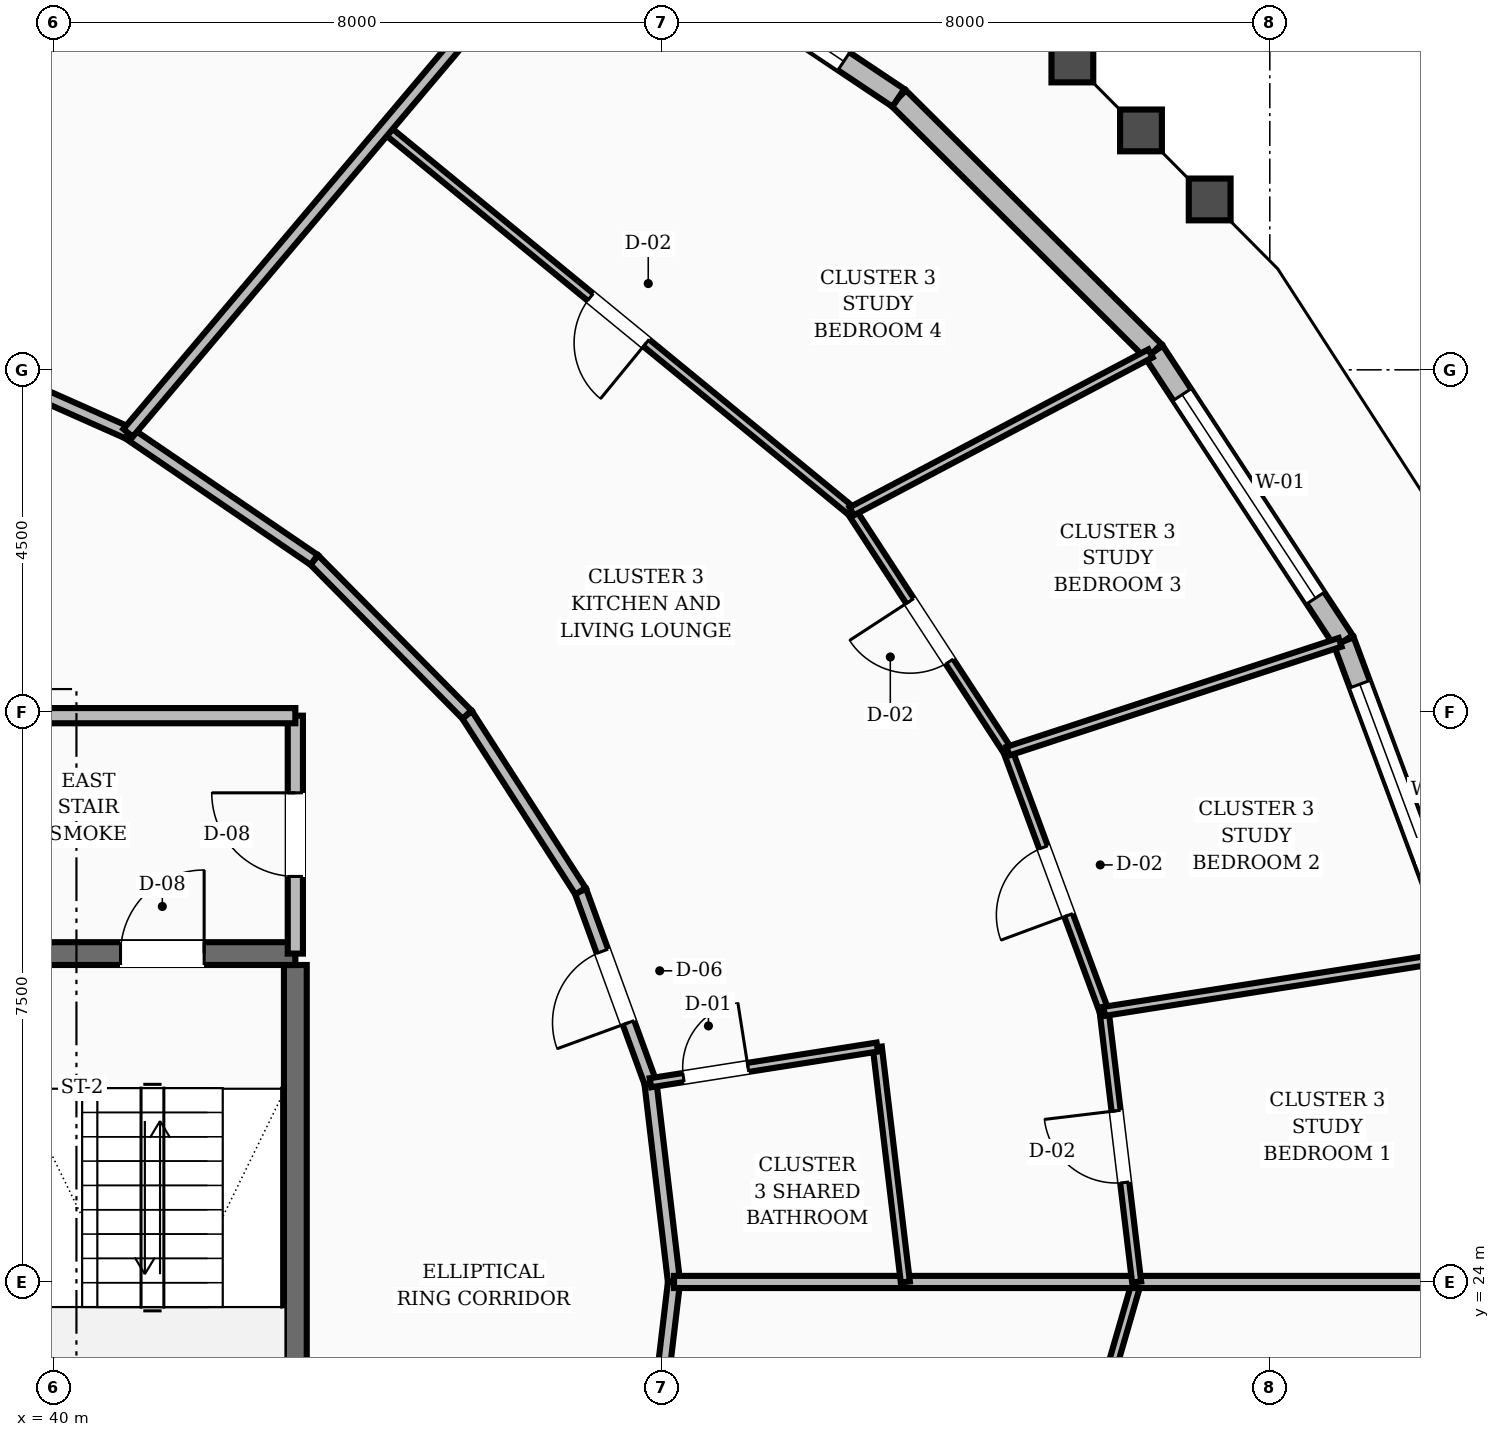
"""IFC4 building model, lengths in metres.
Left out: names, types, materials, properties, quantities, classifications, styles, units other than length and angle.
Written with IfcOpenShell. Run it as: python <this file> out.ifc"""

import sys

from ifc_helpers import new_model, si_unit, direction, frame, frame_2d, origin, place, context, subcontext, project, spatial, rectangle, extrude, element, fill, save


model = new_model("IFC4")
c1 = context("Model", 3, precision=1e-05, world=origin(), true_north=direction((0.0, 1.0)))
c2 = subcontext(c1, "Body", "Model", "MODEL_VIEW")
j1 = project(units=[si_unit("LENGTHUNIT", "METRE"), si_unit("PLANEANGLEUNIT", "RADIAN")], contexts=[c1])
p1 = place(None, origin())
s1 = spatial("IfcSite", under=j1, at=p1, CompositionType="ELEMENT")
p2 = place(p1, origin())
s2 = spatial("IfcBuilding", under=s1, at=p2, CompositionType="ELEMENT")
p3 = place(p2, frame((0.0, 0.0, 77.2)))
s3 = spatial("IfcBuildingStorey", under=s2, at=p3, CompositionType="ELEMENT", Elevation=77.2)
p4 = place(p3, frame((43.18, 19.43, 0.0), z_axis=(0.0, 0.0, 1.0), x_axis=(0.0, 1.0, 0.0)))
e1 = element("IfcWall", 1, at=p4, inside=s3, PredefinedType="SHEAR", context=c2, shape_type="SweptSolid", body=[
    extrude(rectangle(XDim=8.74, YDim=0.3, at=frame_2d((4.37, 0.0))), origin(), (0.0, 0.0, 1.0), 3.6),
])
p5 = place(p3, frame((39.58, 28.32, 0.0), z_axis=(0.0, 0.0, 1.0), x_axis=(1.0, 0.0, 0.0)))
e2 = element("IfcWall", 2, at=p5, inside=s3, PredefinedType="SHEAR", context=c2, shape_type="SweptSolid", body=[
    extrude(rectangle(XDim=3.6, YDim=0.3, at=frame_2d((1.8, 0.0))), origin(), (0.0, 0.0, 1.0), 3.6),
])
p6 = place(p5, frame((1.3, 0.0, 0.0)))
e3 = element("IfcOpeningElement", 3, at=p6, cuts=e2, PredefinedType="OPENING", context=c2, shape_type="SweptSolid", body=[
    extrude(rectangle(XDim=1.1, YDim=2.1, at=frame_2d((0.55, 1.05))), frame((0.0, 0.16, 0.0), z_axis=(0.0, -1.0, 0.0), x_axis=(1.0, 0.0, 0.0)), (0.0, 0.0, 1.0), 0.32),
])
p7 = place(p3, frame((58.511, 28.298, 0.0), z_axis=(0.0, 0.0, 1.0), x_axis=(-0.348859248306, 0.93717513031, 0.0)))
e4 = element("IfcWall", 4, at=p7, inside=s3, PredefinedType="STANDARD", context=c2, shape_type="SweptSolid", body=[
    extrude(rectangle(XDim=4.41, YDim=0.28, at=frame_2d((2.205, 0.0))), origin(), (0.0, 0.0, 1.0), 2.71),
])
p8 = place(p7, frame((0.605, 0.0, 0.8)))
e5 = element("IfcOpeningElement", 5, at=p8, cuts=e4, PredefinedType="OPENING", context=c2, shape_type="SweptSolid", body=[
    extrude(rectangle(XDim=3.2, YDim=1.65, at=frame_2d((1.6, 0.825))), frame((0.0, 0.15, 0.0), z_axis=(0.0, -1.0, 0.0), x_axis=(1.0, 0.0, 0.0)), (0.0, 0.0, 1.0), 0.3),
])
p9 = place(p3, frame((56.973, 32.431, 0.0), z_axis=(0.0, 0.0, 1.0), x_axis=(-0.548388300237, 0.836223817027, 0.0)))
e6 = element("IfcWall", 6, at=p9, inside=s3, PredefinedType="STANDARD", context=c2, shape_type="SweptSolid", body=[
    extrude(rectangle(XDim=4.555, YDim=0.28, at=frame_2d((2.277, 0.0))), origin(), (0.0, 0.0, 1.0), 2.71),
])
p10 = place(p9, frame((0.677, 0.0, 0.8)))
e7 = element("IfcOpeningElement", 7, at=p10, cuts=e6, PredefinedType="OPENING", context=c2, shape_type="SweptSolid", body=[
    extrude(rectangle(XDim=3.2, YDim=1.65, at=frame_2d((1.6, 0.825))), frame((0.0, 0.15, 0.0), z_axis=(0.0, -1.0, 0.0), x_axis=(1.0, 0.0, 0.0)), (0.0, 0.0, 1.0), 0.3),
])
p11 = place(p3, frame((54.475, 36.24, 0.0), z_axis=(0.0, 0.0, 1.0), x_axis=(-0.709550335899, 0.704654752929, 0.0)))
e8 = element("IfcWall", 8, at=p11, inside=s3, PredefinedType="STANDARD", context=c2, shape_type="SweptSolid", body=[
    extrude(rectangle(XDim=4.738, YDim=0.28, at=frame_2d((2.369, 0.0))), origin(), (0.0, 0.0, 1.0), 2.71),
])
p12 = place(p3, frame((51.114, 39.578, 0.0), z_axis=(0.0, 0.0, 1.0), x_axis=(-0.83118805146, 0.555991387623, 0.0)))
e9 = element("IfcWall", 9, at=p12, inside=s3, PredefinedType="STANDARD", context=c2, shape_type="SweptSolid", body=[
    extrude(rectangle(XDim=4.928, YDim=0.28, at=frame_2d((2.464, 0.0))), origin(), (0.0, 0.0, 1.0), 2.71),
])
p13 = place(p12, frame((0.864, 0.0, 0.8)))
e10 = element("IfcOpeningElement", 10, at=p13, cuts=e9, PredefinedType="OPENING", context=c2, shape_type="SweptSolid", body=[
    extrude(rectangle(XDim=3.2, YDim=1.65, at=frame_2d((1.6, 0.825))), frame((0.0, 0.15, 0.0), z_axis=(0.0, -1.0, 0.0), x_axis=(1.0, 0.0, 0.0)), (0.0, 0.0, 1.0), 0.3),
])
p14 = place(p3, frame((43.18, 28.32, 0.0), z_axis=(0.0, 0.0, 1.0), x_axis=(0.0, 1.0, 0.0)))
e11 = element("IfcWall", 11, at=p14, inside=s3, PredefinedType="SOLIDWALL", context=c2, shape_type="SweptSolid", body=[
    extrude(rectangle(XDim=3.13, YDim=0.2, at=frame_2d((1.565, 0.0))), origin(), (0.0, 0.0, 1.0), 2.71),
])
p15 = place(p14, frame((1.015, 0.0, 0.0)))
e12 = element("IfcOpeningElement", 12, at=p15, cuts=e11, PredefinedType="OPENING", context=c2, shape_type="SweptSolid", body=[
    extrude(rectangle(XDim=1.1, YDim=2.1, at=frame_2d((0.55, 1.05))), frame((0.0, 0.11, 0.0), z_axis=(0.0, -1.0, 0.0), x_axis=(1.0, 0.0, 0.0)), (0.0, 0.0, 1.0), 0.22),
])
p16 = place(p3, frame((39.2, 31.45, 0.0), z_axis=(0.0, 0.0, 1.0), x_axis=(1.0, 0.0, 0.0)))
e13 = element("IfcWall", 13, at=p16, inside=s3, PredefinedType="SOLIDWALL", context=c2, shape_type="SweptSolid", body=[
    extrude(rectangle(XDim=3.98, YDim=0.2, at=frame_2d((1.99, 0.0))), origin(), (0.0, 0.0, 1.0), 2.71),
])
p17 = place(p3, frame((48.162, 24.0, 0.0), z_axis=(0.0, 0.0, 1.0), x_axis=(-0.117667763342, 0.993053018459, 0.0)))
e14 = element("IfcWall", 14, at=p17, inside=s3, PredefinedType="SOLIDWALL", context=c2, shape_type="SweptSolid", body=[
    extrude(rectangle(XDim=2.639, YDim=0.16, at=frame_2d((1.32, 0.0))), origin(), (0.0, 0.0, 1.0), 2.71),
])
p18 = place(p3, frame((47.852, 26.621, 0.0), z_axis=(0.0, 0.0, 1.0), x_axis=(-0.342882618672, 0.939378257047, 0.0)))
e15 = element("IfcWall", 15, at=p18, inside=s3, PredefinedType="SOLIDWALL", context=c2, shape_type="SweptSolid", body=[
    extrude(rectangle(XDim=2.683, YDim=0.16, at=frame_2d((1.341, 0.0))), origin(), (0.0, 0.0, 1.0), 2.71),
])
p19 = place(p18, frame((0.841, 0.0, 0.0)))
e16 = element("IfcOpeningElement", 16, at=p19, cuts=e15, PredefinedType="OPENING", context=c2, shape_type="SweptSolid", body=[
    extrude(rectangle(XDim=1.0, YDim=2.1, at=frame_2d((0.5, 1.05))), frame((0.0, 0.09, 0.0), z_axis=(0.0, -1.0, 0.0), x_axis=(1.0, 0.0, 0.0)), (0.0, 0.0, 1.0), 0.18),
])
p20 = place(p3, frame((46.932, 29.141, 0.0), z_axis=(0.0, 0.0, 1.0), x_axis=(-0.540891657444, 0.841092274907, 0.0)))
e17 = element("IfcWall", 17, at=p20, inside=s3, PredefinedType="SOLIDWALL", context=c2, shape_type="SweptSolid", body=[
    extrude(rectangle(XDim=2.761, YDim=0.16, at=frame_2d((1.38, 0.0))), origin(), (0.0, 0.0, 1.0), 2.71),
])
p21 = place(p3, frame((45.438, 31.463, 0.0), z_axis=(0.0, 0.0, 1.0), x_axis=(-0.702569520063, 0.711615113301, 0.0)))
e18 = element("IfcWall", 18, at=p21, inside=s3, PredefinedType="SOLIDWALL", context=c2, shape_type="SweptSolid", body=[
    extrude(rectangle(XDim=2.861, YDim=0.16, at=frame_2d((1.43, 0.0))), origin(), (0.0, 0.0, 1.0), 2.71),
])
p22 = place(p3, frame((43.428, 33.499, 0.0), z_axis=(0.0, 0.0, 1.0), x_axis=(-0.826112340767, 0.563505457323, 0.0)))
e19 = element("IfcWall", 19, at=p22, inside=s3, PredefinedType="SOLIDWALL", context=c2, shape_type="SweptSolid", body=[
    extrude(rectangle(XDim=2.965, YDim=0.16, at=frame_2d((1.482, 0.0))), origin(), (0.0, 0.0, 1.0), 2.71),
])
p23 = place(p3, frame((40.979, 35.17, 0.0), z_axis=(0.0, 0.0, 1.0), x_axis=(-0.913860932409, 0.406027334321, 0.0)))
e20 = element("IfcWall", 20, at=p23, inside=s3, PredefinedType="SOLIDWALL", context=c2, shape_type="SweptSolid", body=[
    extrude(rectangle(XDim=3.058, YDim=0.16, at=frame_2d((1.529, 0.0))), origin(), (0.0, 0.0, 1.0), 2.71),
])
p24 = place(p3, frame((47.852, 21.379, 0.0), z_axis=(0.0, 0.0, 1.0), x_axis=(0.117667763342, 0.993053018459, 0.0)))
e21 = element("IfcWall", 21, at=p24, inside=s3, PredefinedType="SOLIDWALL", context=c2, shape_type="SweptSolid", body=[
    extrude(rectangle(XDim=2.639, YDim=0.16, at=frame_2d((1.32, 0.0))), origin(), (0.0, 0.0, 1.0), 2.71),
])
p25 = place(p3, frame((52.265, 17.137, 0.0), z_axis=(0.0, 0.0, 1.0), x_axis=(0.277595025379, 0.960698184595, 0.0)))
e22 = element("IfcWall", 22, at=p25, inside=s3, PredefinedType="PARTITIONING", context=c2, shape_type="SweptSolid", body=[
    extrude(rectangle(XDim=7.144, YDim=0.12, at=frame_2d((3.572, 0.0))), origin(), (0.0, 0.0, 1.0), 2.71),
])
p26 = place(p25, frame((3.097, 0.0, 0.0)))
e23 = element("IfcOpeningElement", 23, at=p26, cuts=e22, PredefinedType="OPENING", context=c2, shape_type="SweptSolid", body=[
    extrude(rectangle(XDim=0.95, YDim=2.1, at=frame_2d((0.475, 1.05))), frame((0.0, 0.07, 0.0), z_axis=(0.0, -1.0, 0.0), x_axis=(1.0, 0.0, 0.0)), (0.0, 0.0, 1.0), 0.14),
])
p27 = place(p3, frame((48.162, 24.0, 0.0), z_axis=(0.0, 0.0, 1.0), x_axis=(1.0, 0.0, 0.0)))
e24 = element("IfcWall", 24, at=p27, inside=s3, PredefinedType="SOLIDWALL", context=c2, shape_type="SweptSolid", body=[
    extrude(rectangle(XDim=10.819, YDim=0.16, at=frame_2d((5.409, 0.0))), origin(), (0.0, 0.0, 1.0), 2.71),
])
p28 = place(p3, frame((51.205, 24.0, 0.0), z_axis=(0.0, 0.0, 1.0), x_axis=(-0.118529643461, 0.992950514185, 0.0)))
e25 = element("IfcWall", 25, at=p28, inside=s3, PredefinedType="PARTITIONING", context=c2, shape_type="SweptSolid", body=[
    extrude(rectangle(XDim=3.112, YDim=0.12, at=frame_2d((1.556, 0.0))), origin(), (0.0, 0.0, 1.0), 2.71),
])
p29 = place(p3, frame((47.852, 26.621, 0.0), z_axis=(0.0, 0.0, 1.0), x_axis=(0.987853214695, 0.155389916716, 0.0)))
e26 = element("IfcWall", 26, at=p29, inside=s3, PredefinedType="PARTITIONING", context=c2, shape_type="SweptSolid", body=[
    extrude(rectangle(XDim=3.021, YDim=0.12, at=frame_2d((1.511, 0.0))), origin(), (0.0, 0.0, 1.0), 2.71),
])
p30 = place(p29, frame((0.44, 0.0, 0.0)))
e27 = element("IfcOpeningElement", 27, at=p30, cuts=e26, PredefinedType="OPENING", context=c2, shape_type="SweptSolid", body=[
    extrude(rectangle(XDim=0.86, YDim=2.1, at=frame_2d((0.43, 1.05))), frame((0.0, 0.07, 0.0), z_axis=(0.0, -1.0, 0.0), x_axis=(1.0, 0.0, 0.0)), (0.0, 0.0, 1.0), 0.14),
])
p31 = place(p3, frame((54.248, 24.0, 0.0), z_axis=(0.0, 0.0, 1.0), x_axis=(-0.119223081784, 0.99286749205, 0.0)))
e28 = element("IfcWall", 28, at=p31, inside=s3, PredefinedType="PARTITIONING", context=c2, shape_type="SweptSolid", body=[
    extrude(rectangle(XDim=3.586, YDim=0.12, at=frame_2d((1.793, 0.0))), origin(), (0.0, 0.0, 1.0), 2.71),
])
p32 = place(p31, frame((1.318, 0.0, 0.0)))
e29 = element("IfcOpeningElement", 29, at=p32, cuts=e28, PredefinedType="OPENING", context=c2, shape_type="SweptSolid", body=[
    extrude(rectangle(XDim=0.95, YDim=2.1, at=frame_2d((0.475, 1.05))), frame((0.0, 0.07, 0.0), z_axis=(0.0, -1.0, 0.0), x_axis=(1.0, 0.0, 0.0)), (0.0, 0.0, 1.0), 0.14),
])
p33 = place(p3, frame((53.821, 27.56, 0.0), z_axis=(0.0, 0.0, 1.0), x_axis=(-0.34690473698, 0.937900369688, 0.0)))
e30 = element("IfcWall", 30, at=p33, inside=s3, PredefinedType="PARTITIONING", context=c2, shape_type="SweptSolid", body=[
    extrude(rectangle(XDim=3.65, YDim=0.12, at=frame_2d((1.825, 0.0))), origin(), (0.0, 0.0, 1.0), 2.71),
])
p34 = place(p33, frame((1.35, 0.0, 0.0)))
e31 = element("IfcOpeningElement", 31, at=p34, cuts=e30, PredefinedType="OPENING", context=c2, shape_type="SweptSolid", body=[
    extrude(rectangle(XDim=0.95, YDim=2.1, at=frame_2d((0.475, 1.05))), frame((0.0, 0.07, 0.0), z_axis=(0.0, -1.0, 0.0), x_axis=(1.0, 0.0, 0.0)), (0.0, 0.0, 1.0), 0.14),
])
p35 = place(p3, frame((53.821, 27.56, 0.0), z_axis=(0.0, 0.0, 1.0), x_axis=(0.987847508, 0.15542619129, 0.0)))
e32 = element("IfcWall", 32, at=p35, inside=s3, PredefinedType="PARTITIONING", context=c2, shape_type="SweptSolid", body=[
    extrude(rectangle(XDim=4.698, YDim=0.12, at=frame_2d((2.349, 0.0))), origin(), (0.0, 0.0, 1.0), 2.71),
])
p36 = place(p3, frame((52.555, 30.983, 0.0), z_axis=(0.0, 0.0, 1.0), x_axis=(-0.545947365594, 0.837819475783, 0.0)))
e33 = element("IfcWall", 33, at=p36, inside=s3, PredefinedType="PARTITIONING", context=c2, shape_type="SweptSolid", body=[
    extrude(rectangle(XDim=3.766, YDim=0.12, at=frame_2d((1.883, 0.0))), origin(), (0.0, 0.0, 1.0), 2.71),
])
p37 = place(p36, frame((1.408, 0.0, 0.0)))
e34 = element("IfcOpeningElement", 34, at=p37, cuts=e33, PredefinedType="OPENING", context=c2, shape_type="SweptSolid", body=[
    extrude(rectangle(XDim=0.95, YDim=2.1, at=frame_2d((0.475, 1.05))), frame((0.0, 0.07, 0.0), z_axis=(0.0, -1.0, 0.0), x_axis=(1.0, 0.0, 0.0)), (0.0, 0.0, 1.0), 0.14),
])
p38 = place(p3, frame((52.555, 30.983, 0.0), z_axis=(0.0, 0.0, 1.0), x_axis=(0.950305508021, 0.311318874186, 0.0)))
e35 = element("IfcWall", 35, at=p38, inside=s3, PredefinedType="PARTITIONING", context=c2, shape_type="SweptSolid", body=[
    extrude(rectangle(XDim=4.599, YDim=0.12, at=frame_2d((2.3, 0.0))), origin(), (0.0, 0.0, 1.0), 2.71),
])
p39 = place(p3, frame((50.499, 34.138, 0.0), z_axis=(0.0, 0.0, 1.0), x_axis=(-0.773183947555, 0.634181821911, 0.0)))
e36 = element("IfcWall", 36, at=p39, inside=s3, PredefinedType="PARTITIONING", context=c2, shape_type="SweptSolid", body=[
    extrude(rectangle(XDim=7.939, YDim=0.12, at=frame_2d((3.969, 0.0))), origin(), (0.0, 0.0, 1.0), 2.71),
])
p40 = place(p39, frame((3.494, 0.0, 0.0)))
e37 = element("IfcOpeningElement", 37, at=p40, cuts=e36, PredefinedType="OPENING", context=c2, shape_type="SweptSolid", body=[
    extrude(rectangle(XDim=0.95, YDim=2.1, at=frame_2d((0.475, 1.05))), frame((0.0, 0.07, 0.0), z_axis=(0.0, -1.0, 0.0), x_axis=(1.0, 0.0, 0.0)), (0.0, 0.0, 1.0), 0.14),
])
p41 = place(p3, frame((50.499, 34.138, 0.0), z_axis=(0.0, 0.0, 1.0), x_axis=(0.884144182687, 0.467214152418, 0.0)))
e38 = element("IfcWall", 38, at=p41, inside=s3, PredefinedType="PARTITIONING", context=c2, shape_type="SweptSolid", body=[
    extrude(rectangle(XDim=4.447, YDim=0.12, at=frame_2d((2.224, 0.0))), origin(), (0.0, 0.0, 1.0), 2.71),
])
p42 = place(p3, frame((40.979, 35.17, 0.0), z_axis=(0.0, 0.0, 1.0), x_axis=(0.645332911196, 0.763901455508, 0.0)))
e39 = element("IfcWall", 39, at=p42, inside=s3, PredefinedType="SOLIDWALL", context=c2, shape_type="SweptSolid", body=[
    extrude(rectangle(XDim=9.307, YDim=0.16, at=frame_2d((4.653, 0.0))), origin(), (0.0, 0.0, 1.0), 2.71),
])
p43 = place(p8, origin())
e40 = element("IfcWindow", 40, at=p43, inside=s3, PartitioningType="SINGLE_PANEL", PredefinedType="WINDOW", context=c2, shape_type="SweptSolid", body=[
    extrude(rectangle(XDim=3.2, YDim=1.65, at=frame_2d((1.6, 0.825))), frame((0.0, 0.03, 0.0), z_axis=(0.0, -1.0, 0.0), x_axis=(1.0, 0.0, 0.0)), (0.0, 0.0, 1.0), 0.06),
])
fill(e5, e40)
p44 = place(p10, origin())
e41 = element("IfcWindow", 41, at=p44, inside=s3, PartitioningType="SINGLE_PANEL", PredefinedType="WINDOW", context=c2, shape_type="SweptSolid", body=[
    extrude(rectangle(XDim=3.2, YDim=1.65, at=frame_2d((1.6, 0.825))), frame((0.0, 0.03, 0.0), z_axis=(0.0, -1.0, 0.0), x_axis=(1.0, 0.0, 0.0)), (0.0, 0.0, 1.0), 0.06),
])
fill(e7, e41)
p45 = place(p13, origin())
e42 = element("IfcWindow", 42, at=p45, inside=s3, PartitioningType="SINGLE_PANEL", PredefinedType="WINDOW", context=c2, shape_type="SweptSolid", body=[
    extrude(rectangle(XDim=3.2, YDim=1.65, at=frame_2d((1.6, 0.825))), frame((0.0, 0.03, 0.0), z_axis=(0.0, -1.0, 0.0), x_axis=(1.0, 0.0, 0.0)), (0.0, 0.0, 1.0), 0.06),
])
fill(e10, e42)
p46 = place(p6, origin())
e43 = element("IfcDoor", 43, at=p46, inside=s3, OperationType="SINGLE_SWING_RIGHT", PredefinedType="DOOR", context=c2, shape_type="SweptSolid", body=[
    extrude(rectangle(XDim=1.1, YDim=2.1, at=frame_2d((0.55, 1.05))), frame((0.0, 0.025, 0.0), z_axis=(0.0, -1.0, 0.0), x_axis=(1.0, 0.0, 0.0)), (0.0, 0.0, 1.0), 0.05),
])
fill(e3, e43)
p47 = place(p15, origin())
e44 = element("IfcDoor", 44, at=p47, inside=s3, OperationType="SINGLE_SWING_RIGHT", PredefinedType="DOOR", context=c2, shape_type="SweptSolid", body=[
    extrude(rectangle(XDim=1.1, YDim=2.1, at=frame_2d((0.55, 1.05))), frame((0.0, 0.025, 0.0), z_axis=(0.0, -1.0, 0.0), x_axis=(1.0, 0.0, 0.0)), (0.0, 0.0, 1.0), 0.05),
])
fill(e12, e44)
p48 = place(p30, origin())
e45 = element("IfcDoor", 45, at=p48, inside=s3, OperationType="SINGLE_SWING_RIGHT", PredefinedType="DOOR", context=c2, shape_type="SweptSolid", body=[
    extrude(rectangle(XDim=0.86, YDim=2.1, at=frame_2d((0.43, 1.05))), frame((0.0, 0.025, 0.0), z_axis=(0.0, -1.0, 0.0), x_axis=(1.0, 0.0, 0.0)), (0.0, 0.0, 1.0), 0.05),
])
fill(e27, e45)
p49 = place(p19, origin())
e46 = element("IfcDoor", 46, at=p49, inside=s3, OperationType="SINGLE_SWING_LEFT", PredefinedType="DOOR", context=c2, shape_type="SweptSolid", body=[
    extrude(rectangle(XDim=1.0, YDim=2.1, at=frame_2d((0.5, 1.05))), frame((0.0, 0.025, 0.0), z_axis=(0.0, -1.0, 0.0), x_axis=(1.0, 0.0, 0.0)), (0.0, 0.0, 1.0), 0.05),
])
fill(e16, e46)
p50 = place(p32, origin())
e47 = element("IfcDoor", 47, at=p50, inside=s3, OperationType="SINGLE_SWING_RIGHT", PredefinedType="DOOR", context=c2, shape_type="SweptSolid", body=[
    extrude(rectangle(XDim=0.95, YDim=2.1, at=frame_2d((0.475, 1.05))), frame((0.0, 0.025, 0.0), z_axis=(0.0, -1.0, 0.0), x_axis=(1.0, 0.0, 0.0)), (0.0, 0.0, 1.0), 0.05),
])
fill(e29, e47)
p51 = place(p34, origin())
e48 = element("IfcDoor", 48, at=p51, inside=s3, OperationType="SINGLE_SWING_LEFT", PredefinedType="DOOR", context=c2, shape_type="SweptSolid", body=[
    extrude(rectangle(XDim=0.95, YDim=2.1, at=frame_2d((0.475, 1.05))), frame((0.0, 0.025, 0.0), z_axis=(0.0, -1.0, 0.0), x_axis=(1.0, 0.0, 0.0)), (0.0, 0.0, 1.0), 0.05),
])
fill(e31, e48)
p52 = place(p37, origin())
e49 = element("IfcDoor", 49, at=p52, inside=s3, OperationType="SINGLE_SWING_RIGHT", PredefinedType="DOOR", context=c2, shape_type="SweptSolid", body=[
    extrude(rectangle(XDim=0.95, YDim=2.1, at=frame_2d((0.475, 1.05))), frame((0.0, 0.025, 0.0), z_axis=(0.0, -1.0, 0.0), x_axis=(1.0, 0.0, 0.0)), (0.0, 0.0, 1.0), 0.05),
])
fill(e34, e49)
p53 = place(p40, origin())
e50 = element("IfcDoor", 50, at=p53, inside=s3, OperationType="SINGLE_SWING_LEFT", PredefinedType="DOOR", context=c2, shape_type="SweptSolid", body=[
    extrude(rectangle(XDim=0.95, YDim=2.1, at=frame_2d((0.475, 1.05))), frame((0.0, 0.025, 0.0), z_axis=(0.0, -1.0, 0.0), x_axis=(1.0, 0.0, 0.0)), (0.0, 0.0, 1.0), 0.05),
])
fill(e37, e50)
save(model, sys.argv[1])
